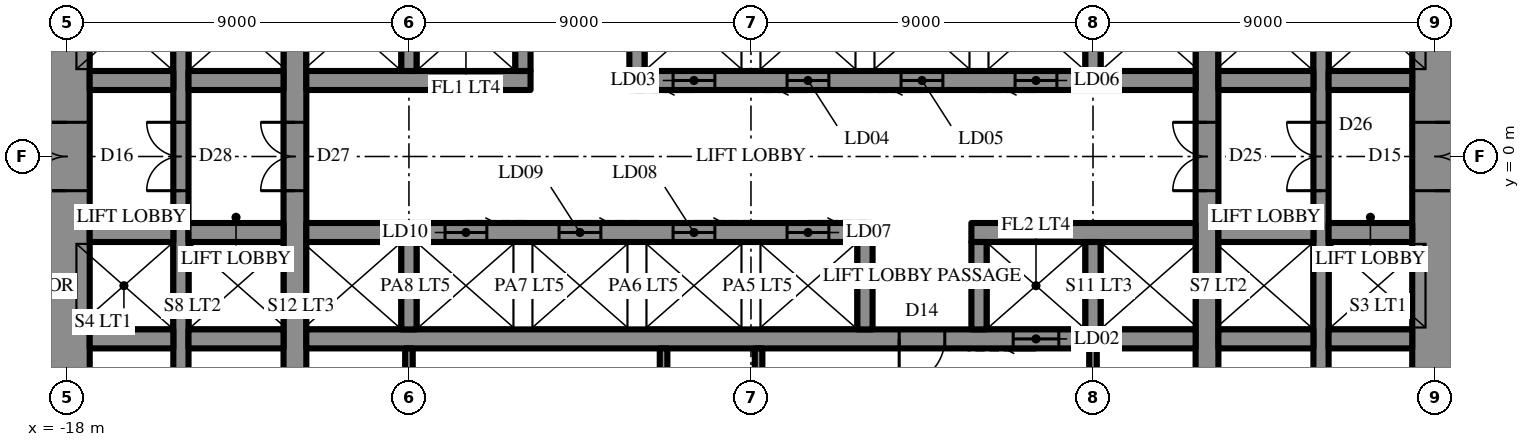
"""IFC4 building model, lengths in metres.
Left out: names, types, materials, properties, quantities, classifications, styles, units other than length and angle.
Written with IfcOpenShell. Run it as: python <this file> out.ifc"""

import sys

from ifc_helpers import new_model, si_unit, direction, frame, frame_2d, origin, place, context, subcontext, project, spatial, rectangle, extrude, element, fill, save


model = new_model("IFC4")
c1 = context("Model", 3, precision=1e-05, world=origin(), true_north=direction((0.0, 1.0)))
c2 = subcontext(c1, "Body", "Model", "MODEL_VIEW")
j1 = project(units=[si_unit("LENGTHUNIT", "METRE"), si_unit("PLANEANGLEUNIT", "RADIAN")], contexts=[c1])
p1 = place(None, origin())
s1 = spatial("IfcSite", under=j1, at=p1, CompositionType="ELEMENT")
p2 = place(p1, origin())
s2 = spatial("IfcBuilding", under=s1, at=p2, CompositionType="ELEMENT")
p3 = place(p2, frame((0.0, 0.0, 13.0)))
s3 = spatial("IfcBuildingStorey", under=s2, at=p3, CompositionType="ELEMENT", Elevation=13.0)
p4 = place(p3, frame((18.0, -10.7, 0.0), z_axis=(0.0, 0.0, 1.0), x_axis=(0.0, 1.0, 0.0)))
e1 = element("IfcWall", 1, at=p4, inside=s3, PredefinedType="SHEAR", context=c2, shape_type="SweptSolid", body=[
    extrude(rectangle(XDim=21.4, YDim=1.2, at=frame_2d((10.7, 0.0))), origin(), (0.0, 0.0, 1.0), 5.5),
])
p5 = place(p4, frame((9.8, 0.0, 0.0)))
e2 = element("IfcOpeningElement", 2, at=p5, cuts=e1, PredefinedType="OPENING", context=c2, shape_type="SweptSolid", body=[
    extrude(rectangle(XDim=1.8, YDim=2.4, at=frame_2d((0.9, 1.2))), frame((0.0, 0.61, 0.0), z_axis=(0.0, -1.0, 0.0), x_axis=(1.0, 0.0, 0.0)), (0.0, 0.0, 1.0), 1.22),
])
p6 = place(p3, frame((-18.0, 10.7, 0.0), z_axis=(0.0, 0.0, 1.0), x_axis=(0.0, -1.0, 0.0)))
e3 = element("IfcWall", 3, at=p6, inside=s3, PredefinedType="SHEAR", context=c2, shape_type="SweptSolid", body=[
    extrude(rectangle(XDim=21.4, YDim=1.2, at=frame_2d((10.7, 0.0))), origin(), (0.0, 0.0, 1.0), 5.5),
])
p7 = place(p6, frame((9.8, 0.0, 0.0)))
e4 = element("IfcOpeningElement", 4, at=p7, cuts=e3, PredefinedType="OPENING", context=c2, shape_type="SweptSolid", body=[
    extrude(rectangle(XDim=1.8, YDim=2.4, at=frame_2d((0.9, 1.2))), frame((0.0, 0.61, 0.0), z_axis=(0.0, -1.0, 0.0), x_axis=(1.0, 0.0, 0.0)), (0.0, 0.0, 1.0), 1.22),
])
p8 = place(p3, frame((12.0, -10.7, 0.0), z_axis=(0.0, 0.0, 1.0), x_axis=(0.0, 1.0, 0.0)))
e5 = element("IfcWall", 5, at=p8, inside=s3, PredefinedType="SHEAR", context=c2, shape_type="SweptSolid", body=[
    extrude(rectangle(XDim=21.4, YDim=0.6, at=frame_2d((10.7, 0.0))), origin(), (0.0, 0.0, 1.0), 5.5),
])
p9 = place(p8, frame((9.8, 0.0, 0.0)))
e6 = element("IfcOpeningElement", 6, at=p9, cuts=e5, PredefinedType="OPENING", context=c2, shape_type="SweptSolid", body=[
    extrude(rectangle(XDim=1.8, YDim=2.4, at=frame_2d((0.9, 1.2))), frame((0.0, 0.31, 0.0), z_axis=(0.0, -1.0, 0.0), x_axis=(1.0, 0.0, 0.0)), (0.0, 0.0, 1.0), 0.62),
])
p10 = place(p3, frame((-12.0, -10.7, 0.0), z_axis=(0.0, 0.0, 1.0), x_axis=(0.0, 1.0, 0.0)))
e7 = element("IfcWall", 7, at=p10, inside=s3, PredefinedType="SHEAR", context=c2, shape_type="SweptSolid", body=[
    extrude(rectangle(XDim=21.4, YDim=0.6, at=frame_2d((10.7, 0.0))), origin(), (0.0, 0.0, 1.0), 5.5),
])
p11 = place(p10, frame((9.8, 0.0, 0.0)))
e8 = element("IfcOpeningElement", 8, at=p11, cuts=e7, PredefinedType="OPENING", context=c2, shape_type="SweptSolid", body=[
    extrude(rectangle(XDim=1.8, YDim=2.4, at=frame_2d((0.9, 1.2))), frame((0.0, 0.31, 0.0), z_axis=(0.0, -1.0, 0.0), x_axis=(1.0, 0.0, 0.0)), (0.0, 0.0, 1.0), 0.62),
])
p12 = place(p3, frame((15.0, -10.7, 0.0), z_axis=(0.0, 0.0, 1.0), x_axis=(0.0, 1.0, 0.0)))
e9 = element("IfcWall", 9, at=p12, inside=s3, PredefinedType="SHEAR", context=c2, shape_type="SweptSolid", body=[
    extrude(rectangle(XDim=21.4, YDim=0.4, at=frame_2d((10.7, 0.0))), origin(), (0.0, 0.0, 1.0), 5.5),
])
p13 = place(p12, frame((9.8, 0.0, 0.0)))
e10 = element("IfcOpeningElement", 10, at=p13, cuts=e9, PredefinedType="OPENING", context=c2, shape_type="SweptSolid", body=[
    extrude(rectangle(XDim=1.8, YDim=2.4, at=frame_2d((0.9, 1.2))), frame((0.0, 0.21, 0.0), z_axis=(0.0, -1.0, 0.0), x_axis=(1.0, 0.0, 0.0)), (0.0, 0.0, 1.0), 0.42),
])
p14 = place(p3, frame((-15.0, -10.7, 0.0), z_axis=(0.0, 0.0, 1.0), x_axis=(0.0, 1.0, 0.0)))
e11 = element("IfcWall", 11, at=p14, inside=s3, PredefinedType="SHEAR", context=c2, shape_type="SweptSolid", body=[
    extrude(rectangle(XDim=21.4, YDim=0.4, at=frame_2d((10.7, 0.0))), origin(), (0.0, 0.0, 1.0), 5.5),
])
p15 = place(p14, frame((9.8, 0.0, 0.0)))
e12 = element("IfcOpeningElement", 12, at=p15, cuts=e11, PredefinedType="OPENING", context=c2, shape_type="SweptSolid", body=[
    extrude(rectangle(XDim=1.8, YDim=2.4, at=frame_2d((0.9, 1.2))), frame((0.0, 0.21, 0.0), z_axis=(0.0, -1.0, 0.0), x_axis=(1.0, 0.0, 0.0)), (0.0, 0.0, 1.0), 0.42),
])
p16 = place(p3, frame((-17.4, 2.0, 0.0), z_axis=(0.0, 0.0, 1.0), x_axis=(1.0, 0.0, 0.0)))
e13 = element("IfcWall", 13, at=p16, inside=s3, PredefinedType="SHEAR", context=c2, shape_type="SweptSolid", body=[
    extrude(rectangle(XDim=2.2, YDim=0.5, at=frame_2d((1.1, 0.0))), origin(), (0.0, 0.0, 1.0), 5.5),
])
p17 = place(p3, frame((-14.8, 2.0, 0.0), z_axis=(0.0, 0.0, 1.0), x_axis=(1.0, 0.0, 0.0)))
e14 = element("IfcWall", 14, at=p17, inside=s3, PredefinedType="SHEAR", context=c2, shape_type="SweptSolid", body=[
    extrude(rectangle(XDim=2.5, YDim=0.5, at=frame_2d((1.25, 0.0))), origin(), (0.0, 0.0, 1.0), 5.5),
])
p18 = place(p3, frame((-11.7, 2.0, 0.0), z_axis=(0.0, 0.0, 1.0), x_axis=(1.0, 0.0, 0.0)))
e15 = element("IfcWall", 15, at=p18, inside=s3, PredefinedType="SHEAR", context=c2, shape_type="SweptSolid", body=[
    extrude(rectangle(XDim=5.9, YDim=0.5, at=frame_2d((2.95, 0.0))), origin(), (0.0, 0.0, 1.0), 5.5),
])
p19 = place(p3, frame((-3.2, 2.0, 0.0), z_axis=(0.0, 0.0, 1.0), x_axis=(1.0, 0.0, 0.0)))
e16 = element("IfcWall", 16, at=p19, inside=s3, PredefinedType="SHEAR", context=c2, shape_type="SweptSolid", body=[
    extrude(rectangle(XDim=14.9, YDim=0.5, at=frame_2d((7.45, 0.0))), origin(), (0.0, 0.0, 1.0), 5.5),
])
p20 = place(p19, frame((1.15, 0.0, 0.0)))
e17 = element("IfcOpeningElement", 17, at=p20, cuts=e16, PredefinedType="OPENING", context=c2, shape_type="SweptSolid", body=[
    extrude(rectangle(XDim=1.1, YDim=2.2, at=frame_2d((0.55, 1.1))), frame((0.0, 0.26, 0.0), z_axis=(0.0, -1.0, 0.0), x_axis=(1.0, 0.0, 0.0)), (0.0, 0.0, 1.0), 0.52),
])
p21 = place(p19, frame((4.15, 0.0, 0.0)))
e18 = element("IfcOpeningElement", 18, at=p21, cuts=e16, PredefinedType="OPENING", context=c2, shape_type="SweptSolid", body=[
    extrude(rectangle(XDim=1.1, YDim=2.2, at=frame_2d((0.55, 1.1))), frame((0.0, 0.26, 0.0), z_axis=(0.0, -1.0, 0.0), x_axis=(1.0, 0.0, 0.0)), (0.0, 0.0, 1.0), 0.52),
])
p22 = place(p19, frame((7.15, 0.0, 0.0)))
e19 = element("IfcOpeningElement", 19, at=p22, cuts=e16, PredefinedType="OPENING", context=c2, shape_type="SweptSolid", body=[
    extrude(rectangle(XDim=1.1, YDim=2.2, at=frame_2d((0.55, 1.1))), frame((0.0, 0.26, 0.0), z_axis=(0.0, -1.0, 0.0), x_axis=(1.0, 0.0, 0.0)), (0.0, 0.0, 1.0), 0.52),
])
p23 = place(p19, frame((10.15, 0.0, 0.0)))
e20 = element("IfcOpeningElement", 20, at=p23, cuts=e16, PredefinedType="OPENING", context=c2, shape_type="SweptSolid", body=[
    extrude(rectangle(XDim=1.1, YDim=2.2, at=frame_2d((0.55, 1.1))), frame((0.0, 0.26, 0.0), z_axis=(0.0, -1.0, 0.0), x_axis=(1.0, 0.0, 0.0)), (0.0, 0.0, 1.0), 0.52),
])
p24 = place(p3, frame((12.3, 2.0, 0.0), z_axis=(0.0, 0.0, 1.0), x_axis=(1.0, 0.0, 0.0)))
e21 = element("IfcWall", 21, at=p24, inside=s3, PredefinedType="SHEAR", context=c2, shape_type="SweptSolid", body=[
    extrude(rectangle(XDim=2.5, YDim=0.5, at=frame_2d((1.25, 0.0))), origin(), (0.0, 0.0, 1.0), 5.5),
])
p25 = place(p3, frame((15.2, 2.0, 0.0), z_axis=(0.0, 0.0, 1.0), x_axis=(1.0, 0.0, 0.0)))
e22 = element("IfcWall", 22, at=p25, inside=s3, PredefinedType="SHEAR", context=c2, shape_type="SweptSolid", body=[
    extrude(rectangle(XDim=2.2, YDim=0.5, at=frame_2d((1.1, 0.0))), origin(), (0.0, 0.0, 1.0), 5.5),
])
for number, where, z_axis, x_axis in (
    (23, (-9.0, 2.25, 0.0), (0.0, 0.0, 1.0), (0.0, 1.0, 0.0)),
    (24, (-6.0, 2.25, 0.0), (0.0, 0.0, 1.0), (0.0, 1.0, 0.0)),
    (25, (-3.0, 2.25, 0.0), (0.0, 0.0, 1.0), (0.0, 1.0, 0.0)),
    (26, (9.0, 2.25, 0.0), (0.0, 0.0, 1.0), (0.0, 1.0, 0.0)),
):
    element("IfcWall", number, at=place(p3, frame(where, z_axis=z_axis, x_axis=x_axis)), inside=s3, PredefinedType="SHEAR", context=c2, shape_type="SweptSolid", body=[
        extrude(rectangle(XDim=2.3, YDim=0.4, at=frame_2d((1.15, 0.0))), origin(), (0.0, 0.0, 1.0), 5.5),
    ])
p26 = place(p3, frame((17.4, -2.0, 0.0), z_axis=(0.0, 0.0, 1.0), x_axis=(-1.0, 0.0, 0.0)))
e27 = element("IfcWall", 27, at=p26, inside=s3, PredefinedType="SHEAR", context=c2, shape_type="SweptSolid", body=[
    extrude(rectangle(XDim=2.2, YDim=0.5, at=frame_2d((1.1, 0.0))), origin(), (0.0, 0.0, 1.0), 5.5),
])
p27 = place(p3, frame((14.8, -2.0, 0.0), z_axis=(0.0, 0.0, 1.0), x_axis=(-1.0, 0.0, 0.0)))
e28 = element("IfcWall", 28, at=p27, inside=s3, PredefinedType="SHEAR", context=c2, shape_type="SweptSolid", body=[
    extrude(rectangle(XDim=2.5, YDim=0.5, at=frame_2d((1.25, 0.0))), origin(), (0.0, 0.0, 1.0), 5.5),
])
p28 = place(p3, frame((11.7, -2.0, 0.0), z_axis=(0.0, 0.0, 1.0), x_axis=(-1.0, 0.0, 0.0)))
e29 = element("IfcWall", 29, at=p28, inside=s3, PredefinedType="SHEAR", context=c2, shape_type="SweptSolid", body=[
    extrude(rectangle(XDim=5.9, YDim=0.5, at=frame_2d((2.95, 0.0))), origin(), (0.0, 0.0, 1.0), 5.5),
])
p29 = place(p3, frame((3.2, -2.0, 0.0), z_axis=(0.0, 0.0, 1.0), x_axis=(-1.0, 0.0, 0.0)))
e30 = element("IfcWall", 30, at=p29, inside=s3, PredefinedType="SHEAR", context=c2, shape_type="SweptSolid", body=[
    extrude(rectangle(XDim=14.9, YDim=0.5, at=frame_2d((7.45, 0.0))), origin(), (0.0, 0.0, 1.0), 5.5),
])
p30 = place(p29, frame((1.15, 0.0, 0.0)))
e31 = element("IfcOpeningElement", 31, at=p30, cuts=e30, PredefinedType="OPENING", context=c2, shape_type="SweptSolid", body=[
    extrude(rectangle(XDim=1.1, YDim=2.2, at=frame_2d((0.55, 1.1))), frame((0.0, 0.26, 0.0), z_axis=(0.0, -1.0, 0.0), x_axis=(1.0, 0.0, 0.0)), (0.0, 0.0, 1.0), 0.52),
])
p31 = place(p29, frame((4.15, 0.0, 0.0)))
e32 = element("IfcOpeningElement", 32, at=p31, cuts=e30, PredefinedType="OPENING", context=c2, shape_type="SweptSolid", body=[
    extrude(rectangle(XDim=1.1, YDim=2.2, at=frame_2d((0.55, 1.1))), frame((0.0, 0.26, 0.0), z_axis=(0.0, -1.0, 0.0), x_axis=(1.0, 0.0, 0.0)), (0.0, 0.0, 1.0), 0.52),
])
p32 = place(p29, frame((7.15, 0.0, 0.0)))
e33 = element("IfcOpeningElement", 33, at=p32, cuts=e30, PredefinedType="OPENING", context=c2, shape_type="SweptSolid", body=[
    extrude(rectangle(XDim=1.1, YDim=2.2, at=frame_2d((0.55, 1.1))), frame((0.0, 0.26, 0.0), z_axis=(0.0, -1.0, 0.0), x_axis=(1.0, 0.0, 0.0)), (0.0, 0.0, 1.0), 0.52),
])
p33 = place(p29, frame((10.15, 0.0, 0.0)))
e34 = element("IfcOpeningElement", 34, at=p33, cuts=e30, PredefinedType="OPENING", context=c2, shape_type="SweptSolid", body=[
    extrude(rectangle(XDim=1.1, YDim=2.2, at=frame_2d((0.55, 1.1))), frame((0.0, 0.26, 0.0), z_axis=(0.0, -1.0, 0.0), x_axis=(1.0, 0.0, 0.0)), (0.0, 0.0, 1.0), 0.52),
])
p34 = place(p3, frame((-12.3, -2.0, 0.0), z_axis=(0.0, 0.0, 1.0), x_axis=(-1.0, 0.0, 0.0)))
e35 = element("IfcWall", 35, at=p34, inside=s3, PredefinedType="SHEAR", context=c2, shape_type="SweptSolid", body=[
    extrude(rectangle(XDim=2.5, YDim=0.5, at=frame_2d((1.25, 0.0))), origin(), (0.0, 0.0, 1.0), 5.5),
])
for number, where, z_axis, x_axis in (
    (36, (-15.2, -2.0, 0.0), (0.0, 0.0, 1.0), (-1.0, 0.0, 0.0)),
    (37, (17.4, -4.8, 0.0), (0.0, 0.0, 1.0), (-1.0, 0.0, 0.0)),
):
    element("IfcWall", number, at=place(p3, frame(where, z_axis=z_axis, x_axis=x_axis)), inside=s3, PredefinedType="SHEAR", context=c2, shape_type="SweptSolid", body=[
        extrude(rectangle(XDim=2.2, YDim=0.5, at=frame_2d((1.1, 0.0))), origin(), (0.0, 0.0, 1.0), 5.5),
    ])
p35 = place(p3, frame((14.8, -4.8, 0.0), z_axis=(0.0, 0.0, 1.0), x_axis=(-1.0, 0.0, 0.0)))
e38 = element("IfcWall", 38, at=p35, inside=s3, PredefinedType="SHEAR", context=c2, shape_type="SweptSolid", body=[
    extrude(rectangle(XDim=2.5, YDim=0.5, at=frame_2d((1.25, 0.0))), origin(), (0.0, 0.0, 1.0), 5.5),
])
p36 = place(p3, frame((11.7, -4.8, 0.0), z_axis=(0.0, 0.0, 1.0), x_axis=(-1.0, 0.0, 0.0)))
e39 = element("IfcWall", 39, at=p36, inside=s3, PredefinedType="SHEAR", context=c2, shape_type="SweptSolid", body=[
    extrude(rectangle(XDim=23.4, YDim=0.5, at=frame_2d((11.7, 0.0))), origin(), (0.0, 0.0, 1.0), 5.5),
])
p37 = place(p36, frame((6.6, 0.0, 0.0)))
e40 = element("IfcOpeningElement", 40, at=p37, cuts=e39, PredefinedType="OPENING", context=c2, shape_type="SweptSolid", body=[
    extrude(rectangle(XDim=1.2, YDim=2.2, at=frame_2d((0.6, 1.1))), frame((0.0, 0.26, 0.0), z_axis=(0.0, -1.0, 0.0), x_axis=(1.0, 0.0, 0.0)), (0.0, 0.0, 1.0), 0.52),
])
p38 = place(p36, frame((3.6, 0.0, 0.0)))
e41 = element("IfcOpeningElement", 41, at=p38, cuts=e39, PredefinedType="OPENING", context=c2, shape_type="SweptSolid", body=[
    extrude(rectangle(XDim=1.2, YDim=2.2, at=frame_2d((0.6, 1.1))), frame((0.0, 0.26, 0.0), z_axis=(0.0, -1.0, 0.0), x_axis=(1.0, 0.0, 0.0)), (0.0, 0.0, 1.0), 0.52),
])
p39 = place(p3, frame((-12.3, -4.8, 0.0), z_axis=(0.0, 0.0, 1.0), x_axis=(-1.0, 0.0, 0.0)))
e42 = element("IfcWall", 42, at=p39, inside=s3, PredefinedType="SHEAR", context=c2, shape_type="SweptSolid", body=[
    extrude(rectangle(XDim=2.5, YDim=0.5, at=frame_2d((1.25, 0.0))), origin(), (0.0, 0.0, 1.0), 5.5),
])
p40 = place(p3, frame((-15.2, -4.8, 0.0), z_axis=(0.0, 0.0, 1.0), x_axis=(-1.0, 0.0, 0.0)))
e43 = element("IfcWall", 43, at=p40, inside=s3, PredefinedType="SHEAR", context=c2, shape_type="SweptSolid", body=[
    extrude(rectangle(XDim=2.2, YDim=0.5, at=frame_2d((1.1, 0.0))), origin(), (0.0, 0.0, 1.0), 5.5),
])
for number, where, z_axis, x_axis in (
    (44, (9.0, -2.25, 0.0), (0.0, 0.0, 1.0), (0.0, -1.0, 0.0)),
    (45, (6.0, -2.25, 0.0), (0.0, 0.0, 1.0), (0.0, -1.0, 0.0)),
    (46, (3.0, -2.25, 0.0), (0.0, 0.0, 1.0), (0.0, -1.0, 0.0)),
    (47, (-9.0, -2.25, 0.0), (0.0, 0.0, 1.0), (0.0, -1.0, 0.0)),
):
    element("IfcWall", number, at=place(p3, frame(where, z_axis=z_axis, x_axis=x_axis)), inside=s3, PredefinedType="SHEAR", context=c2, shape_type="SweptSolid", body=[
        extrude(rectangle(XDim=2.3, YDim=0.4, at=frame_2d((1.15, 0.0))), origin(), (0.0, 0.0, 1.0), 5.5),
    ])
p41 = place(p3, frame((0.2, -5.05, 0.0), z_axis=(0.0, 0.0, 1.0), x_axis=(0.0, -1.0, 0.0)))
e48 = element("IfcWall", 48, at=p41, inside=s3, PredefinedType="SHEAR", context=c2, shape_type="SweptSolid", body=[
    extrude(rectangle(XDim=5.65, YDim=0.2, at=frame_2d((2.825, 0.0))), origin(), (0.0, 0.0, 1.0), 5.5),
])
for number, where, z_axis, x_axis in (
    (49, (9.0, -5.05, 0.0), (0.0, 0.0, 1.0), (0.0, -1.0, 0.0)),
    (50, (-9.0, -5.05, 0.0), (0.0, 0.0, 1.0), (0.0, -1.0, 0.0)),
    (51, (-2.3, -5.05, 0.0), (0.0, 0.0, 1.0), (0.0, -1.0, 0.0)),
):
    element("IfcWall", number, at=place(p3, frame(where, z_axis=z_axis, x_axis=x_axis)), inside=s3, PredefinedType="PARTITIONING", context=c2, shape_type="SweptSolid", body=[
        extrude(rectangle(XDim=5.65, YDim=0.2, at=frame_2d((2.825, 0.0))), origin(), (0.0, 0.0, 1.0), 5.15),
    ])
p42 = place(p5, frame((1.8, 0.0, 0.0), z_axis=(0.0, 0.0, 1.0), x_axis=(-1.0, 0.0, 0.0)))
e52 = element("IfcDoor", 52, at=p42, inside=s3, OperationType="DOUBLE_DOOR_SINGLE_SWING", PredefinedType="DOOR", context=c2, shape_type="SweptSolid", body=[
    extrude(rectangle(XDim=1.8, YDim=2.4, at=frame_2d((0.9, 1.2))), frame((0.0, 0.025, 0.0), z_axis=(0.0, -1.0, 0.0), x_axis=(1.0, 0.0, 0.0)), (0.0, 0.0, 1.0), 0.05),
])
fill(e2, e52)
p43 = place(p7, frame((1.8, 0.0, 0.0), z_axis=(0.0, 0.0, 1.0), x_axis=(-1.0, 0.0, 0.0)))
e53 = element("IfcDoor", 53, at=p43, inside=s3, OperationType="DOUBLE_DOOR_SINGLE_SWING", PredefinedType="DOOR", context=c2, shape_type="SweptSolid", body=[
    extrude(rectangle(XDim=1.8, YDim=2.4, at=frame_2d((0.9, 1.2))), frame((0.0, 0.025, 0.0), z_axis=(0.0, -1.0, 0.0), x_axis=(1.0, 0.0, 0.0)), (0.0, 0.0, 1.0), 0.05),
])
fill(e4, e53)
p44 = place(p37, origin())
e54 = element("IfcDoor", 54, at=p44, inside=s3, OperationType="SINGLE_SWING_LEFT", PredefinedType="DOOR", context=c2, shape_type="SweptSolid", body=[
    extrude(rectangle(XDim=1.2, YDim=2.2, at=frame_2d((0.6, 1.1))), frame((0.0, 0.025, 0.0), z_axis=(0.0, -1.0, 0.0), x_axis=(1.0, 0.0, 0.0)), (0.0, 0.0, 1.0), 0.05),
])
fill(e40, e54)
p45 = place(p9, origin())
e55 = element("IfcDoor", 55, at=p45, inside=s3, OperationType="DOUBLE_DOOR_SINGLE_SWING", PredefinedType="DOOR", context=c2, shape_type="SweptSolid", body=[
    extrude(rectangle(XDim=1.8, YDim=2.4, at=frame_2d((0.9, 1.2))), frame((0.0, 0.025, 0.0), z_axis=(0.0, -1.0, 0.0), x_axis=(1.0, 0.0, 0.0)), (0.0, 0.0, 1.0), 0.05),
])
fill(e6, e55)
p46 = place(p11, origin())
e56 = element("IfcDoor", 56, at=p46, inside=s3, OperationType="DOUBLE_DOOR_SINGLE_SWING", PredefinedType="DOOR", context=c2, shape_type="SweptSolid", body=[
    extrude(rectangle(XDim=1.8, YDim=2.4, at=frame_2d((0.9, 1.2))), frame((0.0, 0.025, 0.0), z_axis=(0.0, -1.0, 0.0), x_axis=(1.0, 0.0, 0.0)), (0.0, 0.0, 1.0), 0.05),
])
fill(e8, e56)
p47 = place(p13, origin())
e57 = element("IfcDoor", 57, at=p47, inside=s3, OperationType="DOUBLE_DOOR_SINGLE_SWING", PredefinedType="DOOR", context=c2, shape_type="SweptSolid", body=[
    extrude(rectangle(XDim=1.8, YDim=2.4, at=frame_2d((0.9, 1.2))), frame((0.0, 0.025, 0.0), z_axis=(0.0, -1.0, 0.0), x_axis=(1.0, 0.0, 0.0)), (0.0, 0.0, 1.0), 0.05),
])
fill(e10, e57)
p48 = place(p15, origin())
e58 = element("IfcDoor", 58, at=p48, inside=s3, OperationType="DOUBLE_DOOR_SINGLE_SWING", PredefinedType="DOOR", context=c2, shape_type="SweptSolid", body=[
    extrude(rectangle(XDim=1.8, YDim=2.4, at=frame_2d((0.9, 1.2))), frame((0.0, 0.025, 0.0), z_axis=(0.0, -1.0, 0.0), x_axis=(1.0, 0.0, 0.0)), (0.0, 0.0, 1.0), 0.05),
])
fill(e12, e58)
p49 = place(p20, frame((1.1, 0.0, 0.0), z_axis=(0.0, 0.0, 1.0), x_axis=(-1.0, 0.0, 0.0)))
e59 = element("IfcDoor", 59, at=p49, inside=s3, OperationType="SLIDING_TO_LEFT", PredefinedType="DOOR", context=c2, shape_type="SweptSolid", body=[
    extrude(rectangle(XDim=1.1, YDim=2.2, at=frame_2d((0.55, 1.1))), frame((0.0, 0.025, 0.0), z_axis=(0.0, -1.0, 0.0), x_axis=(1.0, 0.0, 0.0)), (0.0, 0.0, 1.0), 0.05),
])
fill(e17, e59)
p50 = place(p21, frame((1.1, 0.0, 0.0), z_axis=(0.0, 0.0, 1.0), x_axis=(-1.0, 0.0, 0.0)))
e60 = element("IfcDoor", 60, at=p50, inside=s3, OperationType="SLIDING_TO_LEFT", PredefinedType="DOOR", context=c2, shape_type="SweptSolid", body=[
    extrude(rectangle(XDim=1.1, YDim=2.2, at=frame_2d((0.55, 1.1))), frame((0.0, 0.025, 0.0), z_axis=(0.0, -1.0, 0.0), x_axis=(1.0, 0.0, 0.0)), (0.0, 0.0, 1.0), 0.05),
])
fill(e18, e60)
p51 = place(p22, frame((1.1, 0.0, 0.0), z_axis=(0.0, 0.0, 1.0), x_axis=(-1.0, 0.0, 0.0)))
e61 = element("IfcDoor", 61, at=p51, inside=s3, OperationType="SLIDING_TO_LEFT", PredefinedType="DOOR", context=c2, shape_type="SweptSolid", body=[
    extrude(rectangle(XDim=1.1, YDim=2.2, at=frame_2d((0.55, 1.1))), frame((0.0, 0.025, 0.0), z_axis=(0.0, -1.0, 0.0), x_axis=(1.0, 0.0, 0.0)), (0.0, 0.0, 1.0), 0.05),
])
fill(e19, e61)
p52 = place(p23, frame((1.1, 0.0, 0.0), z_axis=(0.0, 0.0, 1.0), x_axis=(-1.0, 0.0, 0.0)))
e62 = element("IfcDoor", 62, at=p52, inside=s3, OperationType="SLIDING_TO_LEFT", PredefinedType="DOOR", context=c2, shape_type="SweptSolid", body=[
    extrude(rectangle(XDim=1.1, YDim=2.2, at=frame_2d((0.55, 1.1))), frame((0.0, 0.025, 0.0), z_axis=(0.0, -1.0, 0.0), x_axis=(1.0, 0.0, 0.0)), (0.0, 0.0, 1.0), 0.05),
])
fill(e20, e62)
p53 = place(p38, origin())
e63 = element("IfcDoor", 63, at=p53, inside=s3, OperationType="SLIDING_TO_LEFT", PredefinedType="DOOR", context=c2, shape_type="SweptSolid", body=[
    extrude(rectangle(XDim=1.2, YDim=2.2, at=frame_2d((0.6, 1.1))), frame((0.0, 0.025, 0.0), z_axis=(0.0, -1.0, 0.0), x_axis=(1.0, 0.0, 0.0)), (0.0, 0.0, 1.0), 0.05),
])
fill(e41, e63)
p54 = place(p30, frame((1.1, 0.0, 0.0), z_axis=(0.0, 0.0, 1.0), x_axis=(-1.0, 0.0, 0.0)))
e64 = element("IfcDoor", 64, at=p54, inside=s3, OperationType="SLIDING_TO_LEFT", PredefinedType="DOOR", context=c2, shape_type="SweptSolid", body=[
    extrude(rectangle(XDim=1.1, YDim=2.2, at=frame_2d((0.55, 1.1))), frame((0.0, 0.025, 0.0), z_axis=(0.0, -1.0, 0.0), x_axis=(1.0, 0.0, 0.0)), (0.0, 0.0, 1.0), 0.05),
])
fill(e31, e64)
p55 = place(p31, frame((1.1, 0.0, 0.0), z_axis=(0.0, 0.0, 1.0), x_axis=(-1.0, 0.0, 0.0)))
e65 = element("IfcDoor", 65, at=p55, inside=s3, OperationType="SLIDING_TO_LEFT", PredefinedType="DOOR", context=c2, shape_type="SweptSolid", body=[
    extrude(rectangle(XDim=1.1, YDim=2.2, at=frame_2d((0.55, 1.1))), frame((0.0, 0.025, 0.0), z_axis=(0.0, -1.0, 0.0), x_axis=(1.0, 0.0, 0.0)), (0.0, 0.0, 1.0), 0.05),
])
fill(e32, e65)
p56 = place(p32, frame((1.1, 0.0, 0.0), z_axis=(0.0, 0.0, 1.0), x_axis=(-1.0, 0.0, 0.0)))
e66 = element("IfcDoor", 66, at=p56, inside=s3, OperationType="SLIDING_TO_LEFT", PredefinedType="DOOR", context=c2, shape_type="SweptSolid", body=[
    extrude(rectangle(XDim=1.1, YDim=2.2, at=frame_2d((0.55, 1.1))), frame((0.0, 0.025, 0.0), z_axis=(0.0, -1.0, 0.0), x_axis=(1.0, 0.0, 0.0)), (0.0, 0.0, 1.0), 0.05),
])
fill(e33, e66)
p57 = place(p33, frame((1.1, 0.0, 0.0), z_axis=(0.0, 0.0, 1.0), x_axis=(-1.0, 0.0, 0.0)))
e67 = element("IfcDoor", 67, at=p57, inside=s3, OperationType="SLIDING_TO_LEFT", PredefinedType="DOOR", context=c2, shape_type="SweptSolid", body=[
    extrude(rectangle(XDim=1.1, YDim=2.2, at=frame_2d((0.55, 1.1))), frame((0.0, 0.025, 0.0), z_axis=(0.0, -1.0, 0.0), x_axis=(1.0, 0.0, 0.0)), (0.0, 0.0, 1.0), 0.05),
])
fill(e34, e67)
save(model, sys.argv[1])
